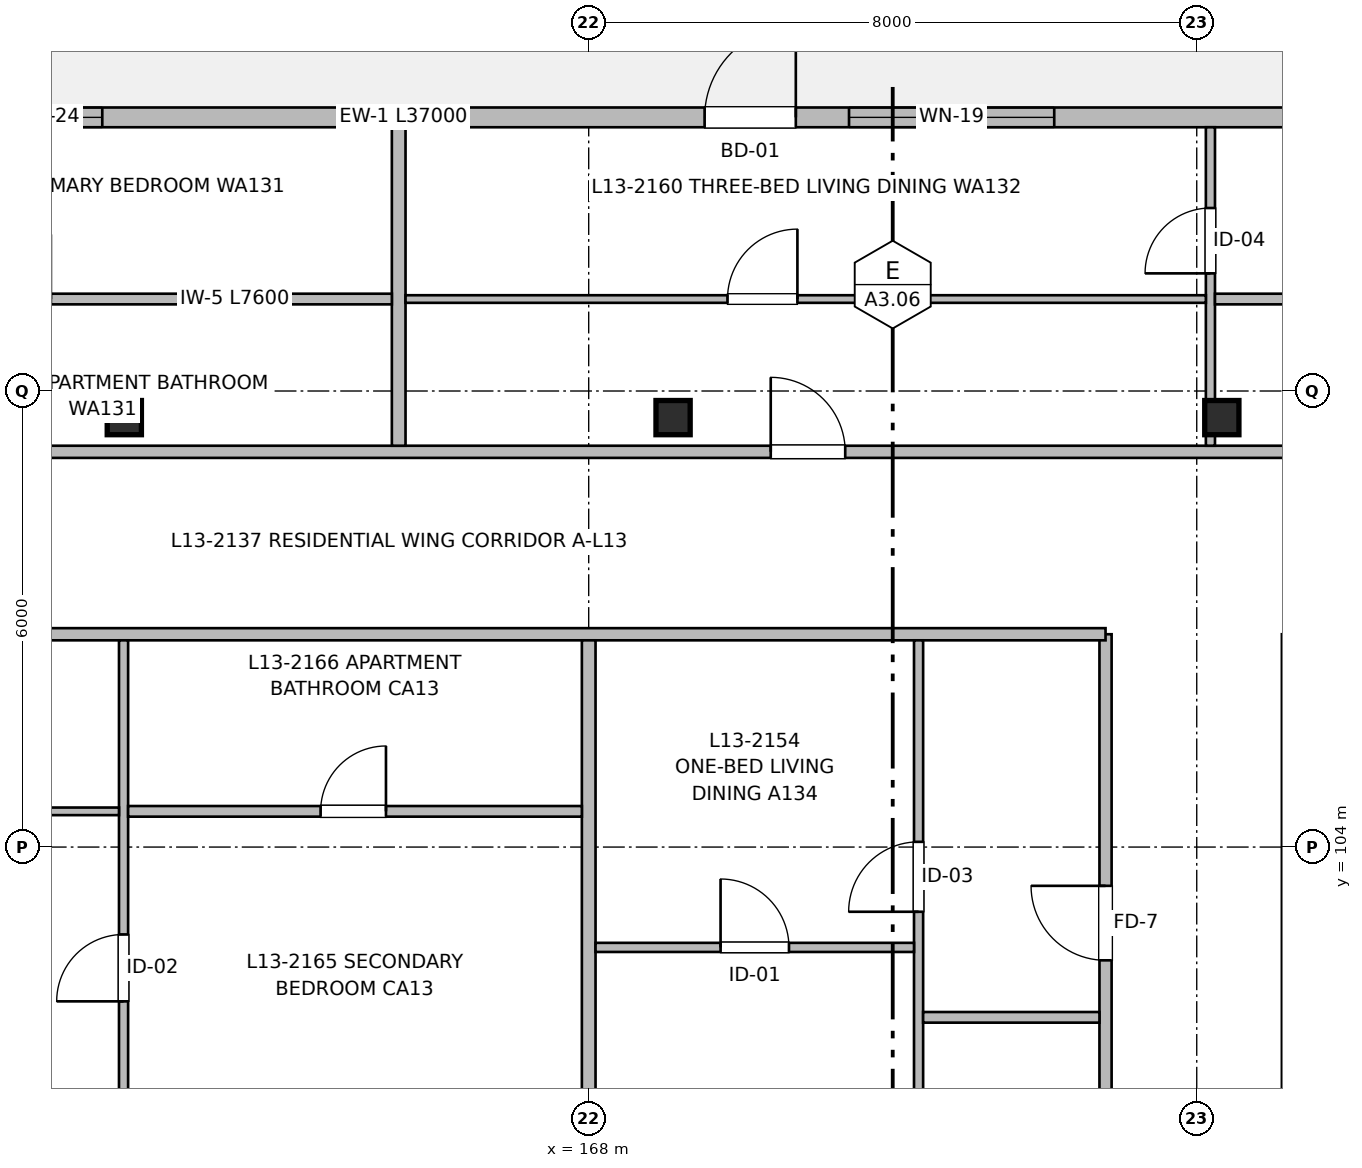
"""IFC4 building model, lengths in metres.
Left out: names, types, materials, properties, quantities, classifications, styles, units other than length and angle.
Written with IfcOpenShell. Run it as: python <this file> out.ifc"""

import sys

from ifc_helpers import new_model, si_unit, direction, frame, frame_2d, origin, origin_2d, place, context, subcontext, project, spatial, rectangle, extrude, element, fill, save


model = new_model("IFC4")
c1 = context("Model", 3, precision=1e-05, world=origin(), true_north=direction((0.0, 1.0)))
c2 = subcontext(c1, "Body", "Model", "MODEL_VIEW")
j1 = project(units=[si_unit("LENGTHUNIT", "METRE"), si_unit("PLANEANGLEUNIT", "RADIAN")], contexts=[c1])
p1 = place(None, origin())
s1 = spatial("IfcSite", under=j1, at=p1, CompositionType="ELEMENT")
p2 = place(p1, origin())
s2 = spatial("IfcBuilding", under=s1, at=p2, CompositionType="ELEMENT")
p3 = place(p2, frame((0.0, 0.0, 42.56)))
s3 = spatial("IfcBuildingStorey", under=s2, at=p3, CompositionType="ELEMENT", Elevation=42.56)
for number, where, z_axis, x_axis in (
    (1, (161.89, 109.65, 0.0), (0.0, 0.0, 1.0), (1.0, 0.0, 0.0)),
    (2, (169.11, 109.65, 0.0), (0.0, 0.0, 1.0), (1.0, 0.0, 0.0)),
    (3, (176.33, 109.65, 0.0), (0.0, 0.0, 1.0), (1.0, 0.0, 0.0)),
):
    element("IfcColumn", number, at=place(p3, frame(where, z_axis=z_axis, x_axis=x_axis)), inside=s3, PredefinedType="COLUMN", context=c2, shape_type="SweptSolid", body=[
        extrude(rectangle(XDim=0.45, YDim=0.45, at=origin_2d()), origin(), (0.0, 0.0, 1.0), 3.2),
    ])
p4 = place(p3, frame((147.0, 113.6, 0.0), z_axis=(0.0, 0.0, 1.0), x_axis=(1.0, 0.0, 0.0)))
e4 = element("IfcWall", 4, at=p4, inside=s3, PredefinedType="SOLIDWALL", context=c2, shape_type="SweptSolid", body=[
    extrude(rectangle(XDim=37.0, YDim=0.26, at=frame_2d((18.5, 0.0))), origin(), (0.0, 0.0, 1.0), 2.98),
])
p5 = place(p4, frame((4.025, 0.0, 0.0)))
e5 = element("IfcOpeningElement", 5, at=p5, cuts=e4, PredefinedType="OPENING", context=c2, shape_type="SweptSolid", body=[
    extrude(rectangle(XDim=1.2, YDim=2.2, at=frame_2d((0.6, 1.1))), frame((0.0, 0.14, 0.0), z_axis=(0.0, -1.0, 0.0), x_axis=(1.0, 0.0, 0.0)), (0.0, 0.0, 1.0), 0.28),
])
p6 = place(p4, frame((5.925, 0.0, 0.9)))
e6 = element("IfcOpeningElement", 6, at=p6, cuts=e4, PredefinedType="OPENING", context=c2, shape_type="SweptSolid", body=[
    extrude(rectangle(XDim=0.65, YDim=0.95, at=frame_2d((0.325, 0.475))), frame((0.0, 0.14, 0.0), z_axis=(0.0, -1.0, 0.0), x_axis=(1.0, 0.0, 0.0)), (0.0, 0.0, 1.0), 0.28),
])
p7 = place(p4, frame((13.15, 0.0, 0.77)))
e7 = element("IfcOpeningElement", 7, at=p7, cuts=e4, PredefinedType="OPENING", context=c2, shape_type="SweptSolid", body=[
    extrude(rectangle(XDim=1.45, YDim=1.45, at=frame_2d((0.725, 0.725))), frame((0.0, 0.14, 0.0), z_axis=(0.0, -1.0, 0.0), x_axis=(1.0, 0.0, 0.0)), (0.0, 0.0, 1.0), 0.28),
])
p8 = place(p4, frame((22.525, 0.0, 0.0)))
e8 = element("IfcOpeningElement", 8, at=p8, cuts=e4, PredefinedType="OPENING", context=c2, shape_type="SweptSolid", body=[
    extrude(rectangle(XDim=1.2, YDim=2.2, at=frame_2d((0.6, 1.1))), frame((0.0, 0.14, 0.0), z_axis=(0.0, -1.0, 0.0), x_axis=(1.0, 0.0, 0.0)), (0.0, 0.0, 1.0), 0.28),
])
p9 = place(p4, frame((24.425, 0.0, 0.47)))
e9 = element("IfcOpeningElement", 9, at=p9, cuts=e4, PredefinedType="OPENING", context=c2, shape_type="SweptSolid", body=[
    extrude(rectangle(XDim=2.7, YDim=1.75, at=frame_2d((1.35, 0.875))), frame((0.0, 0.14, 0.0), z_axis=(0.0, -1.0, 0.0), x_axis=(1.0, 0.0, 0.0)), (0.0, 0.0, 1.0), 0.28),
])
p10 = place(p4, frame((31.075, 0.0, 0.67)))
e10 = element("IfcOpeningElement", 10, at=p10, cuts=e4, PredefinedType="OPENING", context=c2, shape_type="SweptSolid", body=[
    extrude(rectangle(XDim=2.6, YDim=1.55, at=frame_2d((1.3, 0.775))), frame((0.0, 0.14, 0.0), z_axis=(0.0, -1.0, 0.0), x_axis=(1.0, 0.0, 0.0)), (0.0, 0.0, 1.0), 0.28),
])
p11 = place(p3, frame((174.8, 64.56, 0.0), z_axis=(0.0, 0.0, 1.0), x_axis=(0.0, 1.0, 0.0)))
e11 = element("IfcWall", 11, at=p11, inside=s3, PredefinedType="PARTITIONING", context=c2, shape_type="SweptSolid", body=[
    extrude(rectangle(XDim=42.24, YDim=0.16, at=frame_2d((21.12, 0.0))), origin(), (0.0, 0.0, 1.0), 2.935),
])
p12 = place(p11, frame((5.36, 0.0, 0.0)))
e12 = element("IfcOpeningElement", 12, at=p12, cuts=e11, PredefinedType="OPENING", context=c2, shape_type="SweptSolid", body=[
    extrude(rectangle(XDim=0.98, YDim=2.15, at=frame_2d((0.49, 1.075))), frame((0.0, 0.09, 0.0), z_axis=(0.0, -1.0, 0.0), x_axis=(1.0, 0.0, 0.0)), (0.0, 0.0, 1.0), 0.18),
])
p13 = place(p11, frame((16.31, 0.0, 0.0)))
e13 = element("IfcOpeningElement", 13, at=p13, cuts=e11, PredefinedType="OPENING", context=c2, shape_type="SweptSolid", body=[
    extrude(rectangle(XDim=1.02, YDim=2.15, at=frame_2d((0.51, 1.075))), frame((0.0, 0.09, 0.0), z_axis=(0.0, -1.0, 0.0), x_axis=(1.0, 0.0, 0.0)), (0.0, 0.0, 1.0), 0.18),
])
p14 = place(p11, frame((27.72, 0.0, 0.0)))
e14 = element("IfcOpeningElement", 14, at=p14, cuts=e11, PredefinedType="OPENING", context=c2, shape_type="SweptSolid", body=[
    extrude(rectangle(XDim=0.98, YDim=2.15, at=frame_2d((0.49, 1.075))), frame((0.0, 0.09, 0.0), z_axis=(0.0, -1.0, 0.0), x_axis=(1.0, 0.0, 0.0)), (0.0, 0.0, 1.0), 0.18),
])
p15 = place(p11, frame((37.95, 0.0, 0.0)))
e15 = element("IfcOpeningElement", 15, at=p15, cuts=e11, PredefinedType="OPENING", context=c2, shape_type="SweptSolid", body=[
    extrude(rectangle(XDim=0.98, YDim=2.15, at=frame_2d((0.49, 1.075))), frame((0.0, 0.09, 0.0), z_axis=(0.0, -1.0, 0.0), x_axis=(1.0, 0.0, 0.0)), (0.0, 0.0, 1.0), 0.18),
])
p16 = place(p3, frame((177.2, 64.56, 0.0), z_axis=(0.0, 0.0, 1.0), x_axis=(0.0, 1.0, 0.0)))
e16 = element("IfcWall", 16, at=p16, inside=s3, PredefinedType="PARTITIONING", context=c2, shape_type="SweptSolid", body=[
    extrude(rectangle(XDim=42.24, YDim=0.16, at=frame_2d((21.12, 0.0))), origin(), (0.0, 0.0, 1.0), 2.935),
])
p17 = place(p16, frame((4.44, 0.0, 0.0)))
e17 = element("IfcOpeningElement", 17, at=p17, cuts=e16, PredefinedType="OPENING", context=c2, shape_type="SweptSolid", body=[
    extrude(rectangle(XDim=1.1, YDim=2.15, at=frame_2d((0.55, 1.075))), frame((0.0, 0.09, 0.0), z_axis=(0.0, -1.0, 0.0), x_axis=(1.0, 0.0, 0.0)), (0.0, 0.0, 1.0), 0.18),
])
p18 = place(p16, frame((10.84, 0.0, 0.0)))
e18 = element("IfcOpeningElement", 18, at=p18, cuts=e16, PredefinedType="OPENING", context=c2, shape_type="SweptSolid", body=[
    extrude(rectangle(XDim=1.6, YDim=2.15, at=frame_2d((0.8, 1.075))), frame((0.0, 0.09, 0.0), z_axis=(0.0, -1.0, 0.0), x_axis=(1.0, 0.0, 0.0)), (0.0, 0.0, 1.0), 0.18),
])
p19 = place(p16, frame((24.47, 0.0, 0.0)))
e19 = element("IfcOpeningElement", 19, at=p19, cuts=e16, PredefinedType="OPENING", context=c2, shape_type="SweptSolid", body=[
    extrude(rectangle(XDim=0.98, YDim=2.15, at=frame_2d((0.49, 1.075))), frame((0.0, 0.09, 0.0), z_axis=(0.0, -1.0, 0.0), x_axis=(1.0, 0.0, 0.0)), (0.0, 0.0, 1.0), 0.18),
])
p20 = place(p16, frame((32.73, 0.0, 0.0)))
e20 = element("IfcOpeningElement", 20, at=p20, cuts=e16, PredefinedType="OPENING", context=c2, shape_type="SweptSolid", body=[
    extrude(rectangle(XDim=0.98, YDim=2.15, at=frame_2d((0.49, 1.075))), frame((0.0, 0.09, 0.0), z_axis=(0.0, -1.0, 0.0), x_axis=(1.0, 0.0, 0.0)), (0.0, 0.0, 1.0), 0.18),
])
p21 = place(p3, frame((147.16, 106.8, 0.0), z_axis=(0.0, 0.0, 1.0), x_axis=(1.0, 0.0, 0.0)))
e21 = element("IfcWall", 21, at=p21, inside=s3, PredefinedType="PARTITIONING", context=c2, shape_type="SweptSolid", body=[
    extrude(rectangle(XDim=27.64, YDim=0.16, at=frame_2d((13.82, 0.0))), origin(), (0.0, 0.0, 1.0), 2.935),
])
p22 = place(p21, frame((3.515, 0.0, 0.0)))
e22 = element("IfcOpeningElement", 22, at=p22, cuts=e21, PredefinedType="OPENING", context=c2, shape_type="SweptSolid", body=[
    extrude(rectangle(XDim=1.05, YDim=2.15, at=frame_2d((0.525, 1.075))), frame((0.0, 0.09, 0.0), z_axis=(0.0, -1.0, 0.0), x_axis=(1.0, 0.0, 0.0)), (0.0, 0.0, 1.0), 0.18),
])
p23 = place(p21, frame((10.69, 0.0, 0.0)))
e23 = element("IfcOpeningElement", 23, at=p23, cuts=e21, PredefinedType="OPENING", context=c2, shape_type="SweptSolid", body=[
    extrude(rectangle(XDim=0.98, YDim=2.15, at=frame_2d((0.49, 1.075))), frame((0.0, 0.09, 0.0), z_axis=(0.0, -1.0, 0.0), x_axis=(1.0, 0.0, 0.0)), (0.0, 0.0, 1.0), 0.18),
])
p24 = place(p3, frame((147.16, 109.2, 0.0), z_axis=(0.0, 0.0, 1.0), x_axis=(1.0, 0.0, 0.0)))
e24 = element("IfcWall", 24, at=p24, inside=s3, PredefinedType="PARTITIONING", context=c2, shape_type="SweptSolid", body=[
    extrude(rectangle(XDim=36.68, YDim=0.16, at=frame_2d((18.34, 0.0))), origin(), (0.0, 0.0, 1.0), 2.935),
])
p25 = place(p24, frame((4.805, 0.0, 0.0)))
e25 = element("IfcOpeningElement", 25, at=p25, cuts=e24, PredefinedType="OPENING", context=c2, shape_type="SweptSolid", body=[
    extrude(rectangle(XDim=0.98, YDim=2.15, at=frame_2d((0.49, 1.075))), frame((0.0, 0.09, 0.0), z_axis=(0.0, -1.0, 0.0), x_axis=(1.0, 0.0, 0.0)), (0.0, 0.0, 1.0), 0.18),
])
p26 = place(p24, frame((23.235, 0.0, 0.0)))
e26 = element("IfcOpeningElement", 26, at=p26, cuts=e24, PredefinedType="OPENING", context=c2, shape_type="SweptSolid", body=[
    extrude(rectangle(XDim=0.98, YDim=2.15, at=frame_2d((0.49, 1.075))), frame((0.0, 0.09, 0.0), z_axis=(0.0, -1.0, 0.0), x_axis=(1.0, 0.0, 0.0)), (0.0, 0.0, 1.0), 0.18),
])
p27 = place(p3, frame((168.0, 100.05, 0.0), z_axis=(0.0, 0.0, 1.0), x_axis=(0.0, 1.0, 0.0)))
e27 = element("IfcWall", 27, at=p27, inside=s3, PredefinedType="PARTITIONING", context=c2, shape_type="SweptSolid", body=[
    extrude(rectangle(XDim=6.67, YDim=0.18, at=frame_2d((3.335, 0.0))), origin(), (0.0, 0.0, 1.0), 2.935),
])
p28 = place(p3, frame((172.34, 97.53, 0.0), z_axis=(0.0, 0.0, 1.0), x_axis=(0.0, 1.0, 0.0)))
e28 = element("IfcWall", 28, at=p28, inside=s3, PredefinedType="PARTITIONING", context=c2, shape_type="SweptSolid", body=[
    extrude(rectangle(XDim=9.19, YDim=0.12, at=frame_2d((4.595, 0.0))), origin(), (0.0, 0.0, 1.0), 2.935),
])
p29 = place(p28, frame((1.607, 0.0, 0.0)))
e29 = element("IfcOpeningElement", 29, at=p29, cuts=e28, PredefinedType="OPENING", context=c2, shape_type="SweptSolid", body=[
    extrude(rectangle(XDim=0.86, YDim=2.1, at=frame_2d((0.43, 1.05))), frame((0.0, 0.07, 0.0), z_axis=(0.0, -1.0, 0.0), x_axis=(1.0, 0.0, 0.0)), (0.0, 0.0, 1.0), 0.14),
])
p30 = place(p28, frame((5.619, 0.0, 0.0)))
e30 = element("IfcOpeningElement", 30, at=p30, cuts=e28, PredefinedType="OPENING", context=c2, shape_type="SweptSolid", body=[
    extrude(rectangle(XDim=0.92, YDim=2.1, at=frame_2d((0.46, 1.05))), frame((0.0, 0.07, 0.0), z_axis=(0.0, -1.0, 0.0), x_axis=(1.0, 0.0, 0.0)), (0.0, 0.0, 1.0), 0.14),
])
p31 = place(p3, frame((172.4, 101.76, 0.0), z_axis=(0.0, 0.0, 1.0), x_axis=(1.0, 0.0, 0.0)))
e31 = element("IfcWall", 31, at=p31, inside=s3, PredefinedType="PARTITIONING", context=c2, shape_type="SweptSolid", body=[
    extrude(rectangle(XDim=2.32, YDim=0.14, at=frame_2d((1.16, 0.0))), origin(), (0.0, 0.0, 1.0), 2.935),
])
p32 = place(p3, frame((168.09, 102.68, 0.0), z_axis=(0.0, 0.0, 1.0), x_axis=(1.0, 0.0, 0.0)))
e32 = element("IfcWall", 32, at=p32, inside=s3, PredefinedType="PARTITIONING", context=c2, shape_type="SweptSolid", body=[
    extrude(rectangle(XDim=4.19, YDim=0.12, at=frame_2d((2.095, 0.0))), origin(), (0.0, 0.0, 1.0), 2.935),
])
p33 = place(p32, frame((1.645, 0.0, 0.0)))
e33 = element("IfcOpeningElement", 33, at=p33, cuts=e32, PredefinedType="OPENING", context=c2, shape_type="SweptSolid", body=[
    extrude(rectangle(XDim=0.9, YDim=2.1, at=frame_2d((0.45, 1.05))), frame((0.0, 0.07, 0.0), z_axis=(0.0, -1.0, 0.0), x_axis=(1.0, 0.0, 0.0)), (0.0, 0.0, 1.0), 0.14),
])
p34 = place(p3, frame((165.5, 109.28, 0.0), z_axis=(0.0, 0.0, 1.0), x_axis=(0.0, 1.0, 0.0)))
e34 = element("IfcWall", 34, at=p34, inside=s3, PredefinedType="PARTITIONING", context=c2, shape_type="SweptSolid", body=[
    extrude(rectangle(XDim=4.19, YDim=0.18, at=frame_2d((2.095, 0.0))), origin(), (0.0, 0.0, 1.0), 2.935),
])
p35 = place(p3, frame((157.81, 111.21, 0.0), z_axis=(0.0, 0.0, 1.0), x_axis=(1.0, 0.0, 0.0)))
e35 = element("IfcWall", 35, at=p35, inside=s3, PredefinedType="PARTITIONING", context=c2, shape_type="SweptSolid", body=[
    extrude(rectangle(XDim=7.6, YDim=0.14, at=frame_2d((3.8, 0.0))), origin(), (0.0, 0.0, 1.0), 2.935),
])
p36 = place(p35, frame((2.264, 0.0, 0.0)))
e36 = element("IfcOpeningElement", 36, at=p36, cuts=e35, PredefinedType="OPENING", context=c2, shape_type="SweptSolid", body=[
    extrude(rectangle(XDim=0.85, YDim=2.05, at=frame_2d((0.425, 1.025))), frame((0.0, 0.08, 0.0), z_axis=(0.0, -1.0, 0.0), x_axis=(1.0, 0.0, 0.0)), (0.0, 0.0, 1.0), 0.16),
])
p37 = place(p3, frame((176.18, 109.28, 0.0), z_axis=(0.0, 0.0, 1.0), x_axis=(0.0, 1.0, 0.0)))
e37 = element("IfcWall", 37, at=p37, inside=s3, PredefinedType="PARTITIONING", context=c2, shape_type="SweptSolid", body=[
    extrude(rectangle(XDim=4.19, YDim=0.12, at=frame_2d((2.095, 0.0))), origin(), (0.0, 0.0, 1.0), 2.935),
])
p38 = place(p37, frame((2.268, 0.0, 0.0)))
e38 = element("IfcOpeningElement", 38, at=p38, cuts=e37, PredefinedType="OPENING", context=c2, shape_type="SweptSolid", body=[
    extrude(rectangle(XDim=0.86, YDim=2.1, at=frame_2d((0.43, 1.05))), frame((0.0, 0.07, 0.0), z_axis=(0.0, -1.0, 0.0), x_axis=(1.0, 0.0, 0.0)), (0.0, 0.0, 1.0), 0.14),
])
p39 = place(p3, frame((176.24, 111.21, 0.0), z_axis=(0.0, 0.0, 1.0), x_axis=(1.0, 0.0, 0.0)))
e39 = element("IfcWall", 39, at=p39, inside=s3, PredefinedType="PARTITIONING", context=c2, shape_type="SweptSolid", body=[
    extrude(rectangle(XDim=7.6, YDim=0.14, at=frame_2d((3.8, 0.0))), origin(), (0.0, 0.0, 1.0), 2.935),
])
p40 = place(p39, frame((3.064, 0.0, 0.0)))
e40 = element("IfcOpeningElement", 40, at=p40, cuts=e39, PredefinedType="OPENING", context=c2, shape_type="SweptSolid", body=[
    extrude(rectangle(XDim=0.85, YDim=2.05, at=frame_2d((0.425, 1.025))), frame((0.0, 0.08, 0.0), z_axis=(0.0, -1.0, 0.0), x_axis=(1.0, 0.0, 0.0)), (0.0, 0.0, 1.0), 0.16),
])
p41 = place(p3, frame((165.59, 111.21, 0.0), z_axis=(0.0, 0.0, 1.0), x_axis=(1.0, 0.0, 0.0)))
e41 = element("IfcWall", 41, at=p41, inside=s3, PredefinedType="PARTITIONING", context=c2, shape_type="SweptSolid", body=[
    extrude(rectangle(XDim=10.53, YDim=0.1, at=frame_2d((5.265, 0.0))), origin(), (0.0, 0.0, 1.0), 2.935),
])
p42 = place(p41, frame((4.236, 0.0, 0.0)))
e42 = element("IfcOpeningElement", 42, at=p42, cuts=e41, PredefinedType="OPENING", context=c2, shape_type="SweptSolid", body=[
    extrude(rectangle(XDim=0.92, YDim=2.1, at=frame_2d((0.46, 1.05))), frame((0.0, 0.06, 0.0), z_axis=(0.0, -1.0, 0.0), x_axis=(1.0, 0.0, 0.0)), (0.0, 0.0, 1.0), 0.12),
])
p43 = place(p3, frame((161.88, 100.16, 0.0), z_axis=(0.0, 0.0, 1.0), x_axis=(0.0, 1.0, 0.0)))
e43 = element("IfcWall", 43, at=p43, inside=s3, PredefinedType="PARTITIONING", context=c2, shape_type="SweptSolid", body=[
    extrude(rectangle(XDim=6.56, YDim=0.12, at=frame_2d((3.28, 0.0))), origin(), (0.0, 0.0, 1.0), 2.68),
])
p44 = place(p43, frame((1.81, 0.0, 0.0)))
e44 = element("IfcOpeningElement", 44, at=p44, cuts=e43, PredefinedType="OPENING", context=c2, shape_type="SweptSolid", body=[
    extrude(rectangle(XDim=0.88, YDim=2.1, at=frame_2d((0.44, 1.05))), frame((0.0, 0.07, 0.0), z_axis=(0.0, -1.0, 0.0), x_axis=(1.0, 0.0, 0.0)), (0.0, 0.0, 1.0), 0.14),
])
p45 = place(p3, frame((161.94, 104.47, 0.0), z_axis=(0.0, 0.0, 1.0), x_axis=(1.0, 0.0, 0.0)))
e45 = element("IfcWall", 45, at=p45, inside=s3, PredefinedType="PARTITIONING", context=c2, shape_type="SweptSolid", body=[
    extrude(rectangle(XDim=5.97, YDim=0.14, at=frame_2d((2.985, 0.0))), origin(), (0.0, 0.0, 1.0), 2.935),
])
p46 = place(p45, frame((2.533, 0.0, 0.0)))
e46 = element("IfcOpeningElement", 46, at=p46, cuts=e45, PredefinedType="OPENING", context=c2, shape_type="SweptSolid", body=[
    extrude(rectangle(XDim=0.86, YDim=2.1, at=frame_2d((0.43, 1.05))), frame((0.0, 0.08, 0.0), z_axis=(0.0, -1.0, 0.0), x_axis=(1.0, 0.0, 0.0)), (0.0, 0.0, 1.0), 0.16),
])
p47 = place(p3, frame((154.8, 104.47, 0.0), z_axis=(0.0, 0.0, 1.0), x_axis=(1.0, 0.0, 0.0)))
e47 = element("IfcWall", 47, at=p47, inside=s3, PredefinedType="PARTITIONING", context=c2, shape_type="SweptSolid", body=[
    extrude(rectangle(XDim=7.02, YDim=0.1, at=frame_2d((3.51, 0.0))), origin(), (0.0, 0.0, 1.0), 2.935),
])
p48 = place(p47, frame((2.974, 0.0, 0.0)))
e48 = element("IfcOpeningElement", 48, at=p48, cuts=e47, PredefinedType="OPENING", context=c2, shape_type="SweptSolid", body=[
    extrude(rectangle(XDim=0.92, YDim=2.1, at=frame_2d((0.46, 1.05))), frame((0.0, 0.06, 0.0), z_axis=(0.0, -1.0, 0.0), x_axis=(1.0, 0.0, 0.0)), (0.0, 0.0, 1.0), 0.12),
])
p49 = place(p7, origin())
e49 = element("IfcWindow", 49, at=p49, inside=s3, PartitioningType="SINGLE_PANEL", PredefinedType="WINDOW", context=c2, shape_type="SweptSolid", body=[
    extrude(rectangle(XDim=1.45, YDim=1.45, at=frame_2d((0.725, 0.725))), frame((0.0, 0.03, 0.0), z_axis=(0.0, -1.0, 0.0), x_axis=(1.0, 0.0, 0.0)), (0.0, 0.0, 1.0), 0.06),
])
fill(e7, e49)
p50 = place(p8, origin())
e50 = element("IfcDoor", 50, at=p50, inside=s3, OperationType="SINGLE_SWING_RIGHT", PredefinedType="DOOR", context=c2, shape_type="SweptSolid", body=[
    extrude(rectangle(XDim=1.2, YDim=2.2, at=frame_2d((0.6, 1.1))), frame((0.0, 0.025, 0.0), z_axis=(0.0, -1.0, 0.0), x_axis=(1.0, 0.0, 0.0)), (0.0, 0.0, 1.0), 0.05),
])
fill(e8, e50)
p51 = place(p9, origin())
e51 = element("IfcWindow", 51, at=p51, inside=s3, PartitioningType="SINGLE_PANEL", PredefinedType="WINDOW", context=c2, shape_type="SweptSolid", body=[
    extrude(rectangle(XDim=2.7, YDim=1.75, at=frame_2d((1.35, 0.875))), frame((0.0, 0.03, 0.0), z_axis=(0.0, -1.0, 0.0), x_axis=(1.0, 0.0, 0.0)), (0.0, 0.0, 1.0), 0.06),
])
fill(e9, e51)
p52 = place(p30, origin())
e52 = element("IfcDoor", 52, at=p52, inside=s3, OperationType="SINGLE_SWING_LEFT", PredefinedType="DOOR", context=c2, shape_type="SweptSolid", body=[
    extrude(rectangle(XDim=0.92, YDim=2.1, at=frame_2d((0.46, 1.05))), frame((0.0, 0.025, 0.0), z_axis=(0.0, -1.0, 0.0), x_axis=(1.0, 0.0, 0.0)), (0.0, 0.0, 1.0), 0.05),
])
fill(e30, e52)
p53 = place(p15, origin())
e53 = element("IfcDoor", 53, at=p53, inside=s3, OperationType="SINGLE_SWING_RIGHT", PredefinedType="DOOR", context=c2, shape_type="SweptSolid", body=[
    extrude(rectangle(XDim=0.98, YDim=2.15, at=frame_2d((0.49, 1.075))), frame((0.0, 0.025, 0.0), z_axis=(0.0, -1.0, 0.0), x_axis=(1.0, 0.0, 0.0)), (0.0, 0.0, 1.0), 0.05),
])
fill(e15, e53)
p54 = place(p33, origin())
e54 = element("IfcDoor", 54, at=p54, inside=s3, OperationType="SINGLE_SWING_LEFT", PredefinedType="DOOR", context=c2, shape_type="SweptSolid", body=[
    extrude(rectangle(XDim=0.9, YDim=2.1, at=frame_2d((0.45, 1.05))), frame((0.0, 0.025, 0.0), z_axis=(0.0, -1.0, 0.0), x_axis=(1.0, 0.0, 0.0)), (0.0, 0.0, 1.0), 0.05),
])
fill(e33, e54)
p55 = place(p26, origin())
e55 = element("IfcDoor", 55, at=p55, inside=s3, OperationType="SINGLE_SWING_LEFT", PredefinedType="DOOR", context=c2, shape_type="SweptSolid", body=[
    extrude(rectangle(XDim=0.98, YDim=2.15, at=frame_2d((0.49, 1.075))), frame((0.0, 0.025, 0.0), z_axis=(0.0, -1.0, 0.0), x_axis=(1.0, 0.0, 0.0)), (0.0, 0.0, 1.0), 0.05),
])
fill(e26, e55)
p56 = place(p42, origin())
e56 = element("IfcDoor", 56, at=p56, inside=s3, OperationType="SINGLE_SWING_RIGHT", PredefinedType="DOOR", context=c2, shape_type="SweptSolid", body=[
    extrude(rectangle(XDim=0.92, YDim=2.1, at=frame_2d((0.46, 1.05))), frame((0.0, 0.025, 0.0), z_axis=(0.0, -1.0, 0.0), x_axis=(1.0, 0.0, 0.0)), (0.0, 0.0, 1.0), 0.05),
])
fill(e42, e56)
p57 = place(p38, origin())
e57 = element("IfcDoor", 57, at=p57, inside=s3, OperationType="SINGLE_SWING_LEFT", PredefinedType="DOOR", context=c2, shape_type="SweptSolid", body=[
    extrude(rectangle(XDim=0.86, YDim=2.1, at=frame_2d((0.43, 1.05))), frame((0.0, 0.025, 0.0), z_axis=(0.0, -1.0, 0.0), x_axis=(1.0, 0.0, 0.0)), (0.0, 0.0, 1.0), 0.05),
])
fill(e38, e57)
p58 = place(p44, origin())
e58 = element("IfcDoor", 58, at=p58, inside=s3, OperationType="SINGLE_SWING_LEFT", PredefinedType="DOOR", context=c2, shape_type="SweptSolid", body=[
    extrude(rectangle(XDim=0.88, YDim=2.1, at=frame_2d((0.44, 1.05))), frame((0.0, 0.025, 0.0), z_axis=(0.0, -1.0, 0.0), x_axis=(1.0, 0.0, 0.0)), (0.0, 0.0, 1.0), 0.05),
])
fill(e44, e58)
p59 = place(p46, origin())
e59 = element("IfcDoor", 59, at=p59, inside=s3, OperationType="SINGLE_SWING_RIGHT", PredefinedType="DOOR", context=c2, shape_type="SweptSolid", body=[
    extrude(rectangle(XDim=0.86, YDim=2.1, at=frame_2d((0.43, 1.05))), frame((0.0, 0.025, 0.0), z_axis=(0.0, -1.0, 0.0), x_axis=(1.0, 0.0, 0.0)), (0.0, 0.0, 1.0), 0.05),
])
fill(e46, e59)
save(model, sys.argv[1])
